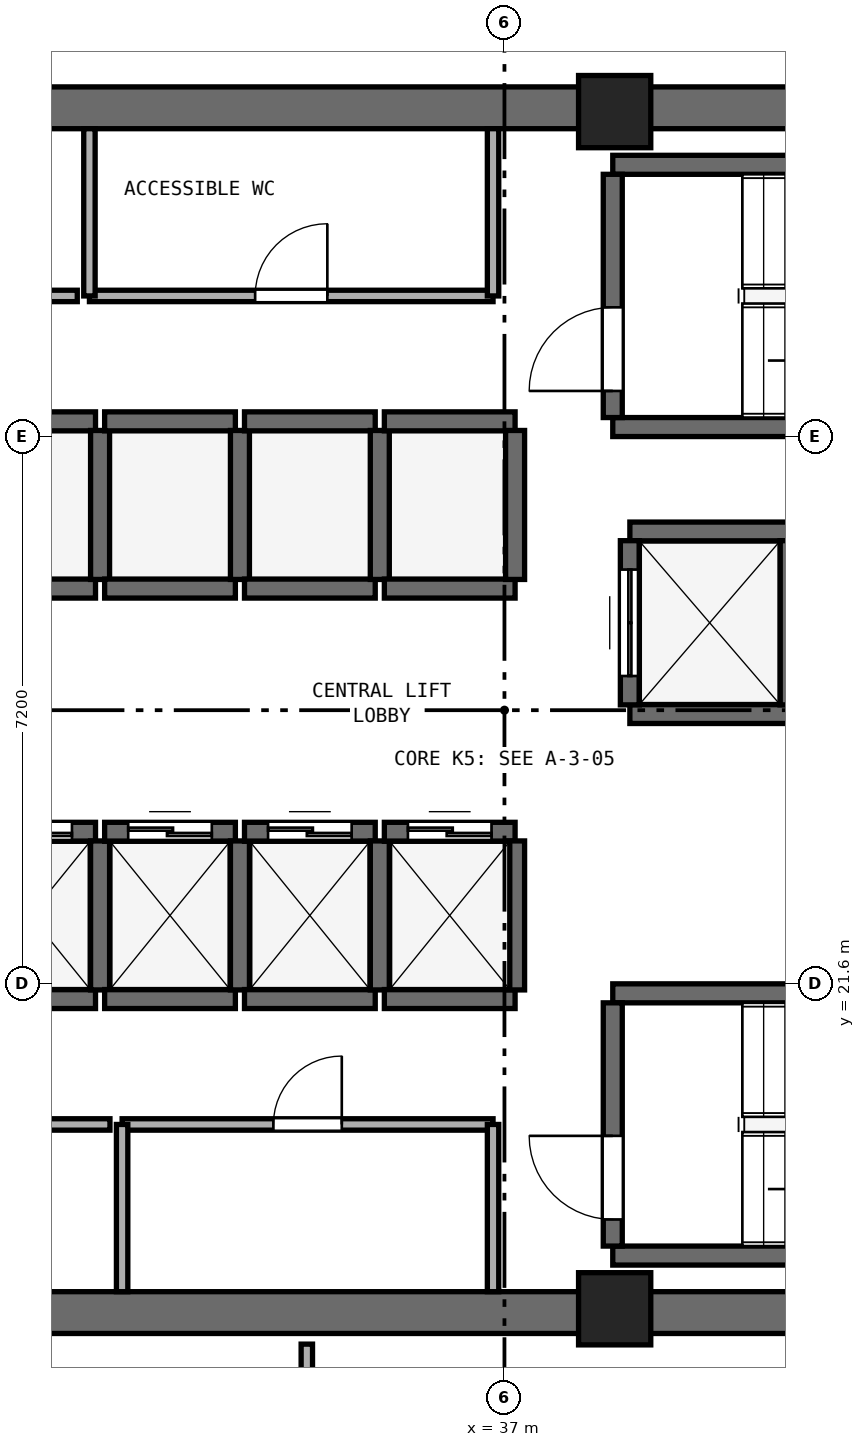
"""IFC4 building model, lengths in metres.
Left out: names, types, materials, properties, quantities, classifications, styles, units other than length and angle.
Written with IfcOpenShell. Run it as: python <this file> out.ifc"""

import sys

from ifc_helpers import new_model, si_unit, direction, frame, frame_2d, origin, origin_2d, place, context, subcontext, project, spatial, rectangle, extrude, element, fill, save


model = new_model("IFC4")
c1 = context("Model", 3, precision=1e-05, world=origin(), true_north=direction((0.0, 1.0)))
c2 = subcontext(c1, "Body", "Model", "MODEL_VIEW")
j1 = project(units=[si_unit("LENGTHUNIT", "METRE"), si_unit("PLANEANGLEUNIT", "RADIAN")], contexts=[c1])
p1 = place(None, origin())
s1 = spatial("IfcSite", under=j1, at=p1, CompositionType="ELEMENT")
p2 = place(p1, origin())
s2 = spatial("IfcBuilding", under=s1, at=p2, CompositionType="ELEMENT")
p3 = place(p2, frame((0.0, 0.0, 201.0)))
s3 = spatial("IfcBuildingStorey", under=s2, at=p3, CompositionType="ELEMENT", Elevation=201.0)
for number, where, z_axis, x_axis in (
    (1, (25.4, 17.275, 0.0), (0.0, 0.0, 1.0), (1.0, 0.0, 0.0)),
    (2, (25.4, 33.125, 0.0), (0.0, 0.0, 1.0), (1.0, 0.0, 0.0)),
):
    element("IfcWall", number, at=place(p3, frame(where, z_axis=z_axis, x_axis=x_axis)), inside=s3, PredefinedType="SHEAR", context=c2, shape_type="SweptSolid", body=[
        extrude(rectangle(XDim=23.2, YDim=0.55, at=frame_2d((11.6, 0.0))), origin(), (0.0, 0.0, 1.0), 3.54),
    ])
for number, where, z_axis, x_axis in (
    (3, (38.45, 17.325, 0.0), (0.0, 0.0, 1.0), (1.0, 0.0, 0.0)),
    (4, (38.45, 33.075, 0.0), (0.0, 0.0, 1.0), (1.0, 0.0, 0.0)),
):
    element("IfcColumn", number, at=place(p3, frame(where, z_axis=z_axis, x_axis=x_axis)), inside=s3, PredefinedType="PILASTER", context=c2, shape_type="SweptSolid", body=[
        extrude(rectangle(XDim=0.95, YDim=0.95, at=origin_2d()), origin(), (0.0, 0.0, 1.0), 3.8),
    ])
for number, where, z_axis, x_axis in (
    (5, (38.425, 28.925, 0.0), (0.0, 0.0, 1.0), (1.0, 0.0, 0.0)),
    (6, (38.425, 32.375, 0.0), (0.0, 0.0, 1.0), (1.0, 0.0, 0.0)),
):
    element("IfcWall", number, at=place(p3, frame(where, z_axis=z_axis, x_axis=x_axis)), inside=s3, PredefinedType="SHEAR", context=c2, shape_type="SweptSolid", body=[
        extrude(rectangle(XDim=7.3, YDim=0.25, at=frame_2d((3.65, 0.0))), origin(), (0.0, 0.0, 1.0), 3.54),
    ])
p4 = place(p3, frame((38.425, 29.05, 0.0), z_axis=(0.0, 0.0, 1.0), x_axis=(0.0, 1.0, 0.0)))
e7 = element("IfcWall", 7, at=p4, inside=s3, PredefinedType="SHEAR", context=c2, shape_type="SweptSolid", body=[
    extrude(rectangle(XDim=3.2, YDim=0.25, at=frame_2d((1.6, 0.0))), origin(), (0.0, 0.0, 1.0), 3.54),
])
p5 = place(p4, frame((0.35, 0.0, 0.0)))
e8 = element("IfcOpeningElement", 8, at=p5, cuts=e7, PredefinedType="OPENING", context=c2, shape_type="SweptSolid", body=[
    extrude(rectangle(XDim=1.1, YDim=2.15, at=frame_2d((0.55, 1.075))), frame((0.0, 0.135, 0.0), z_axis=(0.0, -1.0, 0.0), x_axis=(1.0, 0.0, 0.0)), (0.0, 0.0, 1.0), 0.27),
])
for number, where, z_axis, x_axis in (
    (9, (38.425, 18.025, 0.0), (0.0, 0.0, 1.0), (1.0, 0.0, 0.0)),
    (10, (38.425, 21.475, 0.0), (0.0, 0.0, 1.0), (1.0, 0.0, 0.0)),
):
    element("IfcWall", number, at=place(p3, frame(where, z_axis=z_axis, x_axis=x_axis)), inside=s3, PredefinedType="SHEAR", context=c2, shape_type="SweptSolid", body=[
        extrude(rectangle(XDim=7.3, YDim=0.25, at=frame_2d((3.65, 0.0))), origin(), (0.0, 0.0, 1.0), 3.54),
    ])
p6 = place(p3, frame((38.425, 18.15, 0.0), z_axis=(0.0, 0.0, 1.0), x_axis=(0.0, 1.0, 0.0)))
e11 = element("IfcWall", 11, at=p6, inside=s3, PredefinedType="SHEAR", context=c2, shape_type="SweptSolid", body=[
    extrude(rectangle(XDim=3.2, YDim=0.25, at=frame_2d((1.6, 0.0))), origin(), (0.0, 0.0, 1.0), 3.54),
])
p7 = place(p6, frame((0.35, 0.0, 0.0)))
e12 = element("IfcOpeningElement", 12, at=p7, cuts=e11, PredefinedType="OPENING", context=c2, shape_type="SweptSolid", body=[
    extrude(rectangle(XDim=1.1, YDim=2.15, at=frame_2d((0.55, 1.075))), frame((0.0, 0.135, 0.0), z_axis=(0.0, -1.0, 0.0), x_axis=(1.0, 0.0, 0.0)), (0.0, 0.0, 1.0), 0.27),
])
p8 = place(p3, frame((29.9, 21.4, 0.0), z_axis=(0.0, 0.0, 1.0), x_axis=(1.0, 0.0, 0.0)))
e13 = element("IfcWall", 13, at=p8, inside=s3, PredefinedType="SHEAR", context=c2, shape_type="SweptSolid", body=[
    extrude(rectangle(XDim=1.72, YDim=0.25, at=frame_2d((0.86, 0.0))), origin(), (0.0, 0.0, 1.0), 3.54),
])
p9 = place(p3, frame((29.9, 23.6, 0.0), z_axis=(0.0, 0.0, 1.0), x_axis=(1.0, 0.0, 0.0)))
e14 = element("IfcWall", 14, at=p9, inside=s3, PredefinedType="SHEAR", context=c2, shape_type="SweptSolid", body=[
    extrude(rectangle(XDim=1.72, YDim=0.25, at=frame_2d((0.86, 0.0))), origin(), (0.0, 0.0, 1.0), 3.54),
])
p10 = place(p9, frame((0.31, 0.0, 0.0)))
e15 = element("IfcOpeningElement", 15, at=p10, cuts=e14, PredefinedType="OPENING", context=c2, shape_type="SweptSolid", body=[
    extrude(rectangle(XDim=1.1, YDim=2.15, at=frame_2d((0.55, 1.075))), frame((0.0, 0.135, 0.0), z_axis=(0.0, -1.0, 0.0), x_axis=(1.0, 0.0, 0.0)), (0.0, 0.0, 1.0), 0.27),
])
p11 = place(p3, frame((31.68, 21.52, 0.0), z_axis=(0.0, 0.0, 1.0), x_axis=(0.0, 1.0, 0.0)))
e16 = element("IfcWall", 16, at=p11, inside=s3, PredefinedType="SHEAR", context=c2, shape_type="SweptSolid", body=[
    extrude(rectangle(XDim=1.96, YDim=0.25, at=frame_2d((0.98, 0.0))), origin(), (0.0, 0.0, 1.0), 3.54),
])
p12 = place(p3, frame((31.74, 21.4, 0.0), z_axis=(0.0, 0.0, 1.0), x_axis=(1.0, 0.0, 0.0)))
e17 = element("IfcWall", 17, at=p12, inside=s3, PredefinedType="SHEAR", context=c2, shape_type="SweptSolid", body=[
    extrude(rectangle(XDim=1.72, YDim=0.25, at=frame_2d((0.86, 0.0))), origin(), (0.0, 0.0, 1.0), 3.54),
])
p13 = place(p3, frame((31.74, 23.6, 0.0), z_axis=(0.0, 0.0, 1.0), x_axis=(1.0, 0.0, 0.0)))
e18 = element("IfcWall", 18, at=p13, inside=s3, PredefinedType="SHEAR", context=c2, shape_type="SweptSolid", body=[
    extrude(rectangle(XDim=1.72, YDim=0.25, at=frame_2d((0.86, 0.0))), origin(), (0.0, 0.0, 1.0), 3.54),
])
p14 = place(p13, frame((0.31, 0.0, 0.0)))
e19 = element("IfcOpeningElement", 19, at=p14, cuts=e18, PredefinedType="OPENING", context=c2, shape_type="SweptSolid", body=[
    extrude(rectangle(XDim=1.1, YDim=2.15, at=frame_2d((0.55, 1.075))), frame((0.0, 0.135, 0.0), z_axis=(0.0, -1.0, 0.0), x_axis=(1.0, 0.0, 0.0)), (0.0, 0.0, 1.0), 0.27),
])
p15 = place(p3, frame((33.52, 21.52, 0.0), z_axis=(0.0, 0.0, 1.0), x_axis=(0.0, 1.0, 0.0)))
e20 = element("IfcWall", 20, at=p15, inside=s3, PredefinedType="SHEAR", context=c2, shape_type="SweptSolid", body=[
    extrude(rectangle(XDim=1.96, YDim=0.25, at=frame_2d((0.98, 0.0))), origin(), (0.0, 0.0, 1.0), 3.54),
])
p16 = place(p3, frame((33.58, 21.4, 0.0), z_axis=(0.0, 0.0, 1.0), x_axis=(1.0, 0.0, 0.0)))
e21 = element("IfcWall", 21, at=p16, inside=s3, PredefinedType="SHEAR", context=c2, shape_type="SweptSolid", body=[
    extrude(rectangle(XDim=1.72, YDim=0.25, at=frame_2d((0.86, 0.0))), origin(), (0.0, 0.0, 1.0), 3.54),
])
p17 = place(p3, frame((33.58, 23.6, 0.0), z_axis=(0.0, 0.0, 1.0), x_axis=(1.0, 0.0, 0.0)))
e22 = element("IfcWall", 22, at=p17, inside=s3, PredefinedType="SHEAR", context=c2, shape_type="SweptSolid", body=[
    extrude(rectangle(XDim=1.72, YDim=0.25, at=frame_2d((0.86, 0.0))), origin(), (0.0, 0.0, 1.0), 3.54),
])
p18 = place(p17, frame((0.31, 0.0, 0.0)))
e23 = element("IfcOpeningElement", 23, at=p18, cuts=e22, PredefinedType="OPENING", context=c2, shape_type="SweptSolid", body=[
    extrude(rectangle(XDim=1.1, YDim=2.15, at=frame_2d((0.55, 1.075))), frame((0.0, 0.135, 0.0), z_axis=(0.0, -1.0, 0.0), x_axis=(1.0, 0.0, 0.0)), (0.0, 0.0, 1.0), 0.27),
])
p19 = place(p3, frame((35.36, 21.52, 0.0), z_axis=(0.0, 0.0, 1.0), x_axis=(0.0, 1.0, 0.0)))
e24 = element("IfcWall", 24, at=p19, inside=s3, PredefinedType="SHEAR", context=c2, shape_type="SweptSolid", body=[
    extrude(rectangle(XDim=1.96, YDim=0.25, at=frame_2d((0.98, 0.0))), origin(), (0.0, 0.0, 1.0), 3.54),
])
p20 = place(p3, frame((35.42, 21.4, 0.0), z_axis=(0.0, 0.0, 1.0), x_axis=(1.0, 0.0, 0.0)))
e25 = element("IfcWall", 25, at=p20, inside=s3, PredefinedType="SHEAR", context=c2, shape_type="SweptSolid", body=[
    extrude(rectangle(XDim=1.72, YDim=0.25, at=frame_2d((0.86, 0.0))), origin(), (0.0, 0.0, 1.0), 3.54),
])
p21 = place(p3, frame((35.42, 23.6, 0.0), z_axis=(0.0, 0.0, 1.0), x_axis=(1.0, 0.0, 0.0)))
e26 = element("IfcWall", 26, at=p21, inside=s3, PredefinedType="SHEAR", context=c2, shape_type="SweptSolid", body=[
    extrude(rectangle(XDim=1.72, YDim=0.25, at=frame_2d((0.86, 0.0))), origin(), (0.0, 0.0, 1.0), 3.54),
])
p22 = place(p21, frame((0.31, 0.0, 0.0)))
e27 = element("IfcOpeningElement", 27, at=p22, cuts=e26, PredefinedType="OPENING", context=c2, shape_type="SweptSolid", body=[
    extrude(rectangle(XDim=1.1, YDim=2.15, at=frame_2d((0.55, 1.075))), frame((0.0, 0.135, 0.0), z_axis=(0.0, -1.0, 0.0), x_axis=(1.0, 0.0, 0.0)), (0.0, 0.0, 1.0), 0.27),
])
p23 = place(p3, frame((37.14, 21.52, 0.0), z_axis=(0.0, 0.0, 1.0), x_axis=(0.0, 1.0, 0.0)))
e28 = element("IfcWall", 28, at=p23, inside=s3, PredefinedType="SHEAR", context=c2, shape_type="SweptSolid", body=[
    extrude(rectangle(XDim=1.96, YDim=0.25, at=frame_2d((0.98, 0.0))), origin(), (0.0, 0.0, 1.0), 3.54),
])
for number, where, z_axis, x_axis in (
    (29, (29.9, 26.8, 0.0), (0.0, 0.0, 1.0), (1.0, 0.0, 0.0)),
    (30, (29.9, 29.0, 0.0), (0.0, 0.0, 1.0), (1.0, 0.0, 0.0)),
):
    element("IfcWall", number, at=place(p3, frame(where, z_axis=z_axis, x_axis=x_axis)), inside=s3, PredefinedType="SHEAR", context=c2, shape_type="SweptSolid", body=[
        extrude(rectangle(XDim=1.72, YDim=0.25, at=frame_2d((0.86, 0.0))), origin(), (0.0, 0.0, 1.0), 3.54),
    ])
p24 = place(p3, frame((31.68, 26.92, 0.0), z_axis=(0.0, 0.0, 1.0), x_axis=(0.0, 1.0, 0.0)))
e31 = element("IfcWall", 31, at=p24, inside=s3, PredefinedType="SHEAR", context=c2, shape_type="SweptSolid", body=[
    extrude(rectangle(XDim=1.96, YDim=0.25, at=frame_2d((0.98, 0.0))), origin(), (0.0, 0.0, 1.0), 3.54),
])
for number, where, z_axis, x_axis in (
    (32, (31.74, 26.8, 0.0), (0.0, 0.0, 1.0), (1.0, 0.0, 0.0)),
    (33, (31.74, 29.0, 0.0), (0.0, 0.0, 1.0), (1.0, 0.0, 0.0)),
):
    element("IfcWall", number, at=place(p3, frame(where, z_axis=z_axis, x_axis=x_axis)), inside=s3, PredefinedType="SHEAR", context=c2, shape_type="SweptSolid", body=[
        extrude(rectangle(XDim=1.72, YDim=0.25, at=frame_2d((0.86, 0.0))), origin(), (0.0, 0.0, 1.0), 3.54),
    ])
p25 = place(p3, frame((33.52, 26.92, 0.0), z_axis=(0.0, 0.0, 1.0), x_axis=(0.0, 1.0, 0.0)))
e34 = element("IfcWall", 34, at=p25, inside=s3, PredefinedType="SHEAR", context=c2, shape_type="SweptSolid", body=[
    extrude(rectangle(XDim=1.96, YDim=0.25, at=frame_2d((0.98, 0.0))), origin(), (0.0, 0.0, 1.0), 3.54),
])
for number, where, z_axis, x_axis in (
    (35, (33.58, 26.8, 0.0), (0.0, 0.0, 1.0), (1.0, 0.0, 0.0)),
    (36, (33.58, 29.0, 0.0), (0.0, 0.0, 1.0), (1.0, 0.0, 0.0)),
):
    element("IfcWall", number, at=place(p3, frame(where, z_axis=z_axis, x_axis=x_axis)), inside=s3, PredefinedType="SHEAR", context=c2, shape_type="SweptSolid", body=[
        extrude(rectangle(XDim=1.72, YDim=0.25, at=frame_2d((0.86, 0.0))), origin(), (0.0, 0.0, 1.0), 3.54),
    ])
p26 = place(p3, frame((35.36, 26.92, 0.0), z_axis=(0.0, 0.0, 1.0), x_axis=(0.0, 1.0, 0.0)))
e37 = element("IfcWall", 37, at=p26, inside=s3, PredefinedType="SHEAR", context=c2, shape_type="SweptSolid", body=[
    extrude(rectangle(XDim=1.96, YDim=0.25, at=frame_2d((0.98, 0.0))), origin(), (0.0, 0.0, 1.0), 3.54),
])
for number, where, z_axis, x_axis in (
    (38, (35.42, 26.8, 0.0), (0.0, 0.0, 1.0), (1.0, 0.0, 0.0)),
    (39, (35.42, 29.0, 0.0), (0.0, 0.0, 1.0), (1.0, 0.0, 0.0)),
):
    element("IfcWall", number, at=place(p3, frame(where, z_axis=z_axis, x_axis=x_axis)), inside=s3, PredefinedType="SHEAR", context=c2, shape_type="SweptSolid", body=[
        extrude(rectangle(XDim=1.72, YDim=0.25, at=frame_2d((0.86, 0.0))), origin(), (0.0, 0.0, 1.0), 3.54),
    ])
p27 = place(p3, frame((37.14, 26.92, 0.0), z_axis=(0.0, 0.0, 1.0), x_axis=(0.0, 1.0, 0.0)))
e40 = element("IfcWall", 40, at=p27, inside=s3, PredefinedType="SHEAR", context=c2, shape_type="SweptSolid", body=[
    extrude(rectangle(XDim=1.96, YDim=0.25, at=frame_2d((0.98, 0.0))), origin(), (0.0, 0.0, 1.0), 3.54),
])
for number, where, z_axis, x_axis in (
    (41, (38.65, 25.15, 0.0), (0.0, 0.0, 1.0), (1.0, 0.0, 0.0)),
    (42, (38.65, 27.55, 0.0), (0.0, 0.0, 1.0), (1.0, 0.0, 0.0)),
):
    element("IfcWall", number, at=place(p3, frame(where, z_axis=z_axis, x_axis=x_axis)), inside=s3, PredefinedType="SHEAR", context=c2, shape_type="SweptSolid", body=[
        extrude(rectangle(XDim=2.1, YDim=0.25, at=frame_2d((1.05, 0.0))), origin(), (0.0, 0.0, 1.0), 3.54),
    ])
p28 = place(p3, frame((38.65, 25.27, 0.0), z_axis=(0.0, 0.0, 1.0), x_axis=(0.0, 1.0, 0.0)))
e43 = element("IfcWall", 43, at=p28, inside=s3, PredefinedType="SHEAR", context=c2, shape_type="SweptSolid", body=[
    extrude(rectangle(XDim=2.16, YDim=0.25, at=frame_2d((1.08, 0.0))), origin(), (0.0, 0.0, 1.0), 3.54),
])
p29 = place(p28, frame((0.38, 0.0, 0.0)))
e44 = element("IfcOpeningElement", 44, at=p29, cuts=e43, PredefinedType="OPENING", context=c2, shape_type="SweptSolid", body=[
    extrude(rectangle(XDim=1.4, YDim=2.2, at=frame_2d((0.7, 1.1))), frame((0.0, 0.135, 0.0), z_axis=(0.0, -1.0, 0.0), x_axis=(1.0, 0.0, 0.0)), (0.0, 0.0, 1.0), 0.27),
])
p30 = place(p3, frame((40.75, 25.27, 0.0), z_axis=(0.0, 0.0, 1.0), x_axis=(0.0, 1.0, 0.0)))
e45 = element("IfcWall", 45, at=p30, inside=s3, PredefinedType="SHEAR", context=c2, shape_type="SweptSolid", body=[
    extrude(rectangle(XDim=2.16, YDim=0.25, at=frame_2d((1.08, 0.0))), origin(), (0.0, 0.0, 1.0), 3.54),
])
p31 = place(p3, frame((26.07, 30.65, 0.0), z_axis=(0.0, 0.0, 1.0), x_axis=(1.0, 0.0, 0.0)))
e46 = element("IfcWall", 46, at=p31, inside=s3, PredefinedType="PARTITIONING", context=c2, shape_type="SweptSolid", body=[
    extrude(rectangle(XDim=5.31, YDim=0.15, at=frame_2d((2.655, 0.0))), origin(), (0.0, 0.0, 1.0), 3.54),
])
p32 = place(p31, frame((2.18, 0.0, 0.0)))
e47 = element("IfcOpeningElement", 47, at=p32, cuts=e46, PredefinedType="OPENING", context=c2, shape_type="SweptSolid", body=[
    extrude(rectangle(XDim=0.95, YDim=2.1, at=frame_2d((0.475, 1.05))), frame((0.0, 0.085, 0.0), z_axis=(0.0, -1.0, 0.0), x_axis=(1.0, 0.0, 0.0)), (0.0, 0.0, 1.0), 0.17),
])
p33 = place(p3, frame((31.54, 30.65, 0.0), z_axis=(0.0, 0.0, 1.0), x_axis=(1.0, 0.0, 0.0)))
e48 = element("IfcWall", 48, at=p33, inside=s3, PredefinedType="PARTITIONING", context=c2, shape_type="SweptSolid", body=[
    extrude(rectangle(XDim=5.31, YDim=0.15, at=frame_2d((2.655, 0.0))), origin(), (0.0, 0.0, 1.0), 3.54),
])
p34 = place(p33, frame((2.18, 0.0, 0.0)))
e49 = element("IfcOpeningElement", 49, at=p34, cuts=e48, PredefinedType="OPENING", context=c2, shape_type="SweptSolid", body=[
    extrude(rectangle(XDim=0.95, YDim=2.1, at=frame_2d((0.475, 1.05))), frame((0.0, 0.085, 0.0), z_axis=(0.0, -1.0, 0.0), x_axis=(1.0, 0.0, 0.0)), (0.0, 0.0, 1.0), 0.17),
])
for number, where, z_axis, x_axis in (
    (50, (31.54, 30.65, 0.0), (0.0, 0.0, 1.0), (0.0, 1.0, 0.0)),
    (51, (36.85, 30.65, 0.0), (0.0, 0.0, 1.0), (0.0, 1.0, 0.0)),
):
    element("IfcWall", number, at=place(p3, frame(where, z_axis=z_axis, x_axis=x_axis)), inside=s3, PredefinedType="PARTITIONING", context=c2, shape_type="SweptSolid", body=[
        extrude(rectangle(XDim=2.2, YDim=0.15, at=frame_2d((1.1, 0.0))), origin(), (0.0, 0.0, 1.0), 3.54),
    ])
p35 = place(p3, frame((26.07, 19.75, 0.0), z_axis=(0.0, 0.0, 1.0), x_axis=(1.0, 0.0, 0.0)))
e52 = element("IfcWall", 52, at=p35, inside=s3, PredefinedType="PARTITIONING", context=c2, shape_type="SweptSolid", body=[
    extrude(rectangle(XDim=5.74, YDim=0.15, at=frame_2d((2.87, 0.0))), origin(), (0.0, 0.0, 1.0), 3.54),
])
p36 = place(p35, frame((2.395, 0.0, 0.0)))
e53 = element("IfcOpeningElement", 53, at=p36, cuts=e52, PredefinedType="OPENING", context=c2, shape_type="SweptSolid", body=[
    extrude(rectangle(XDim=0.95, YDim=2.1, at=frame_2d((0.475, 1.05))), frame((0.0, 0.085, 0.0), z_axis=(0.0, -1.0, 0.0), x_axis=(1.0, 0.0, 0.0)), (0.0, 0.0, 1.0), 0.17),
])
p37 = place(p3, frame((31.97, 19.75, 0.0), z_axis=(0.0, 0.0, 1.0), x_axis=(1.0, 0.0, 0.0)))
e54 = element("IfcWall", 54, at=p37, inside=s3, PredefinedType="PARTITIONING", context=c2, shape_type="SweptSolid", body=[
    extrude(rectangle(XDim=4.88, YDim=0.15, at=frame_2d((2.44, 0.0))), origin(), (0.0, 0.0, 1.0), 3.54),
])
p38 = place(p37, frame((1.99, 0.0, 0.0)))
e55 = element("IfcOpeningElement", 55, at=p38, cuts=e54, PredefinedType="OPENING", context=c2, shape_type="SweptSolid", body=[
    extrude(rectangle(XDim=0.9, YDim=2.1, at=frame_2d((0.45, 1.05))), frame((0.0, 0.085, 0.0), z_axis=(0.0, -1.0, 0.0), x_axis=(1.0, 0.0, 0.0)), (0.0, 0.0, 1.0), 0.17),
])
for number, where, z_axis, x_axis in (
    (56, (31.97, 17.55, 0.0), (0.0, 0.0, 1.0), (0.0, 1.0, 0.0)),
    (57, (36.85, 17.55, 0.0), (0.0, 0.0, 1.0), (0.0, 1.0, 0.0)),
):
    element("IfcWall", number, at=place(p3, frame(where, z_axis=z_axis, x_axis=x_axis)), inside=s3, PredefinedType="PARTITIONING", context=c2, shape_type="SweptSolid", body=[
        extrude(rectangle(XDim=2.2, YDim=0.15, at=frame_2d((1.1, 0.0))), origin(), (0.0, 0.0, 1.0), 3.54),
    ])
p39 = place(p3, frame((34.4, 15.35, 0.0), z_axis=(0.0, 0.0, 1.0), x_axis=(0.0, 1.0, 0.0)))
e58 = element("IfcWall", 58, at=p39, inside=s3, PredefinedType="PARTITIONING", context=c2, shape_type="SweptSolid", body=[
    extrude(rectangle(XDim=1.51, YDim=0.15, at=frame_2d((0.755, 0.0))), origin(), (0.0, 0.0, 1.0), 3.54),
])
p40 = place(p5, origin())
e59 = element("IfcDoor", 59, at=p40, inside=s3, OperationType="SINGLE_SWING_LEFT", PredefinedType="DOOR", context=c2, shape_type="SweptSolid", body=[
    extrude(rectangle(XDim=1.1, YDim=2.15, at=frame_2d((0.55, 1.075))), frame((0.0, 0.025, 0.0), z_axis=(0.0, -1.0, 0.0), x_axis=(1.0, 0.0, 0.0)), (0.0, 0.0, 1.0), 0.05),
])
fill(e8, e59)
p41 = place(p7, origin())
e60 = element("IfcDoor", 60, at=p41, inside=s3, OperationType="SINGLE_SWING_RIGHT", PredefinedType="DOOR", context=c2, shape_type="SweptSolid", body=[
    extrude(rectangle(XDim=1.1, YDim=2.15, at=frame_2d((0.55, 1.075))), frame((0.0, 0.025, 0.0), z_axis=(0.0, -1.0, 0.0), x_axis=(1.0, 0.0, 0.0)), (0.0, 0.0, 1.0), 0.05),
])
fill(e12, e60)
p42 = place(p10, origin())
e61 = element("IfcDoor", 61, at=p42, inside=s3, OperationType="DOUBLE_DOOR_SLIDING", PredefinedType="DOOR", context=c2, shape_type="SweptSolid", body=[
    extrude(rectangle(XDim=1.1, YDim=2.15, at=frame_2d((0.55, 1.075))), frame((0.0, 0.025, 0.0), z_axis=(0.0, -1.0, 0.0), x_axis=(1.0, 0.0, 0.0)), (0.0, 0.0, 1.0), 0.05),
])
fill(e15, e61)
p43 = place(p14, origin())
e62 = element("IfcDoor", 62, at=p43, inside=s3, OperationType="DOUBLE_DOOR_SLIDING", PredefinedType="DOOR", context=c2, shape_type="SweptSolid", body=[
    extrude(rectangle(XDim=1.1, YDim=2.15, at=frame_2d((0.55, 1.075))), frame((0.0, 0.025, 0.0), z_axis=(0.0, -1.0, 0.0), x_axis=(1.0, 0.0, 0.0)), (0.0, 0.0, 1.0), 0.05),
])
fill(e19, e62)
p44 = place(p18, origin())
e63 = element("IfcDoor", 63, at=p44, inside=s3, OperationType="DOUBLE_DOOR_SLIDING", PredefinedType="DOOR", context=c2, shape_type="SweptSolid", body=[
    extrude(rectangle(XDim=1.1, YDim=2.15, at=frame_2d((0.55, 1.075))), frame((0.0, 0.025, 0.0), z_axis=(0.0, -1.0, 0.0), x_axis=(1.0, 0.0, 0.0)), (0.0, 0.0, 1.0), 0.05),
])
fill(e23, e63)
p45 = place(p22, origin())
e64 = element("IfcDoor", 64, at=p45, inside=s3, OperationType="DOUBLE_DOOR_SLIDING", PredefinedType="DOOR", context=c2, shape_type="SweptSolid", body=[
    extrude(rectangle(XDim=1.1, YDim=2.15, at=frame_2d((0.55, 1.075))), frame((0.0, 0.025, 0.0), z_axis=(0.0, -1.0, 0.0), x_axis=(1.0, 0.0, 0.0)), (0.0, 0.0, 1.0), 0.05),
])
fill(e27, e64)
p46 = place(p29, origin())
e65 = element("IfcDoor", 65, at=p46, inside=s3, OperationType="DOUBLE_DOOR_SLIDING", PredefinedType="DOOR", context=c2, shape_type="SweptSolid", body=[
    extrude(rectangle(XDim=1.4, YDim=2.2, at=frame_2d((0.7, 1.1))), frame((0.0, 0.025, 0.0), z_axis=(0.0, -1.0, 0.0), x_axis=(1.0, 0.0, 0.0)), (0.0, 0.0, 1.0), 0.05),
])
fill(e44, e65)
p47 = place(p34, origin())
e66 = element("IfcDoor", 66, at=p47, inside=s3, OperationType="SINGLE_SWING_RIGHT", PredefinedType="DOOR", context=c2, shape_type="SweptSolid", body=[
    extrude(rectangle(XDim=0.95, YDim=2.1, at=frame_2d((0.475, 1.05))), frame((0.0, 0.025, 0.0), z_axis=(0.0, -1.0, 0.0), x_axis=(1.0, 0.0, 0.0)), (0.0, 0.0, 1.0), 0.05),
])
fill(e49, e66)
p48 = place(p38, origin())
e67 = element("IfcDoor", 67, at=p48, inside=s3, OperationType="SINGLE_SWING_RIGHT", PredefinedType="DOOR", context=c2, shape_type="SweptSolid", body=[
    extrude(rectangle(XDim=0.9, YDim=2.1, at=frame_2d((0.45, 1.05))), frame((0.0, 0.025, 0.0), z_axis=(0.0, -1.0, 0.0), x_axis=(1.0, 0.0, 0.0)), (0.0, 0.0, 1.0), 0.05),
])
fill(e55, e67)
save(model, sys.argv[1])
